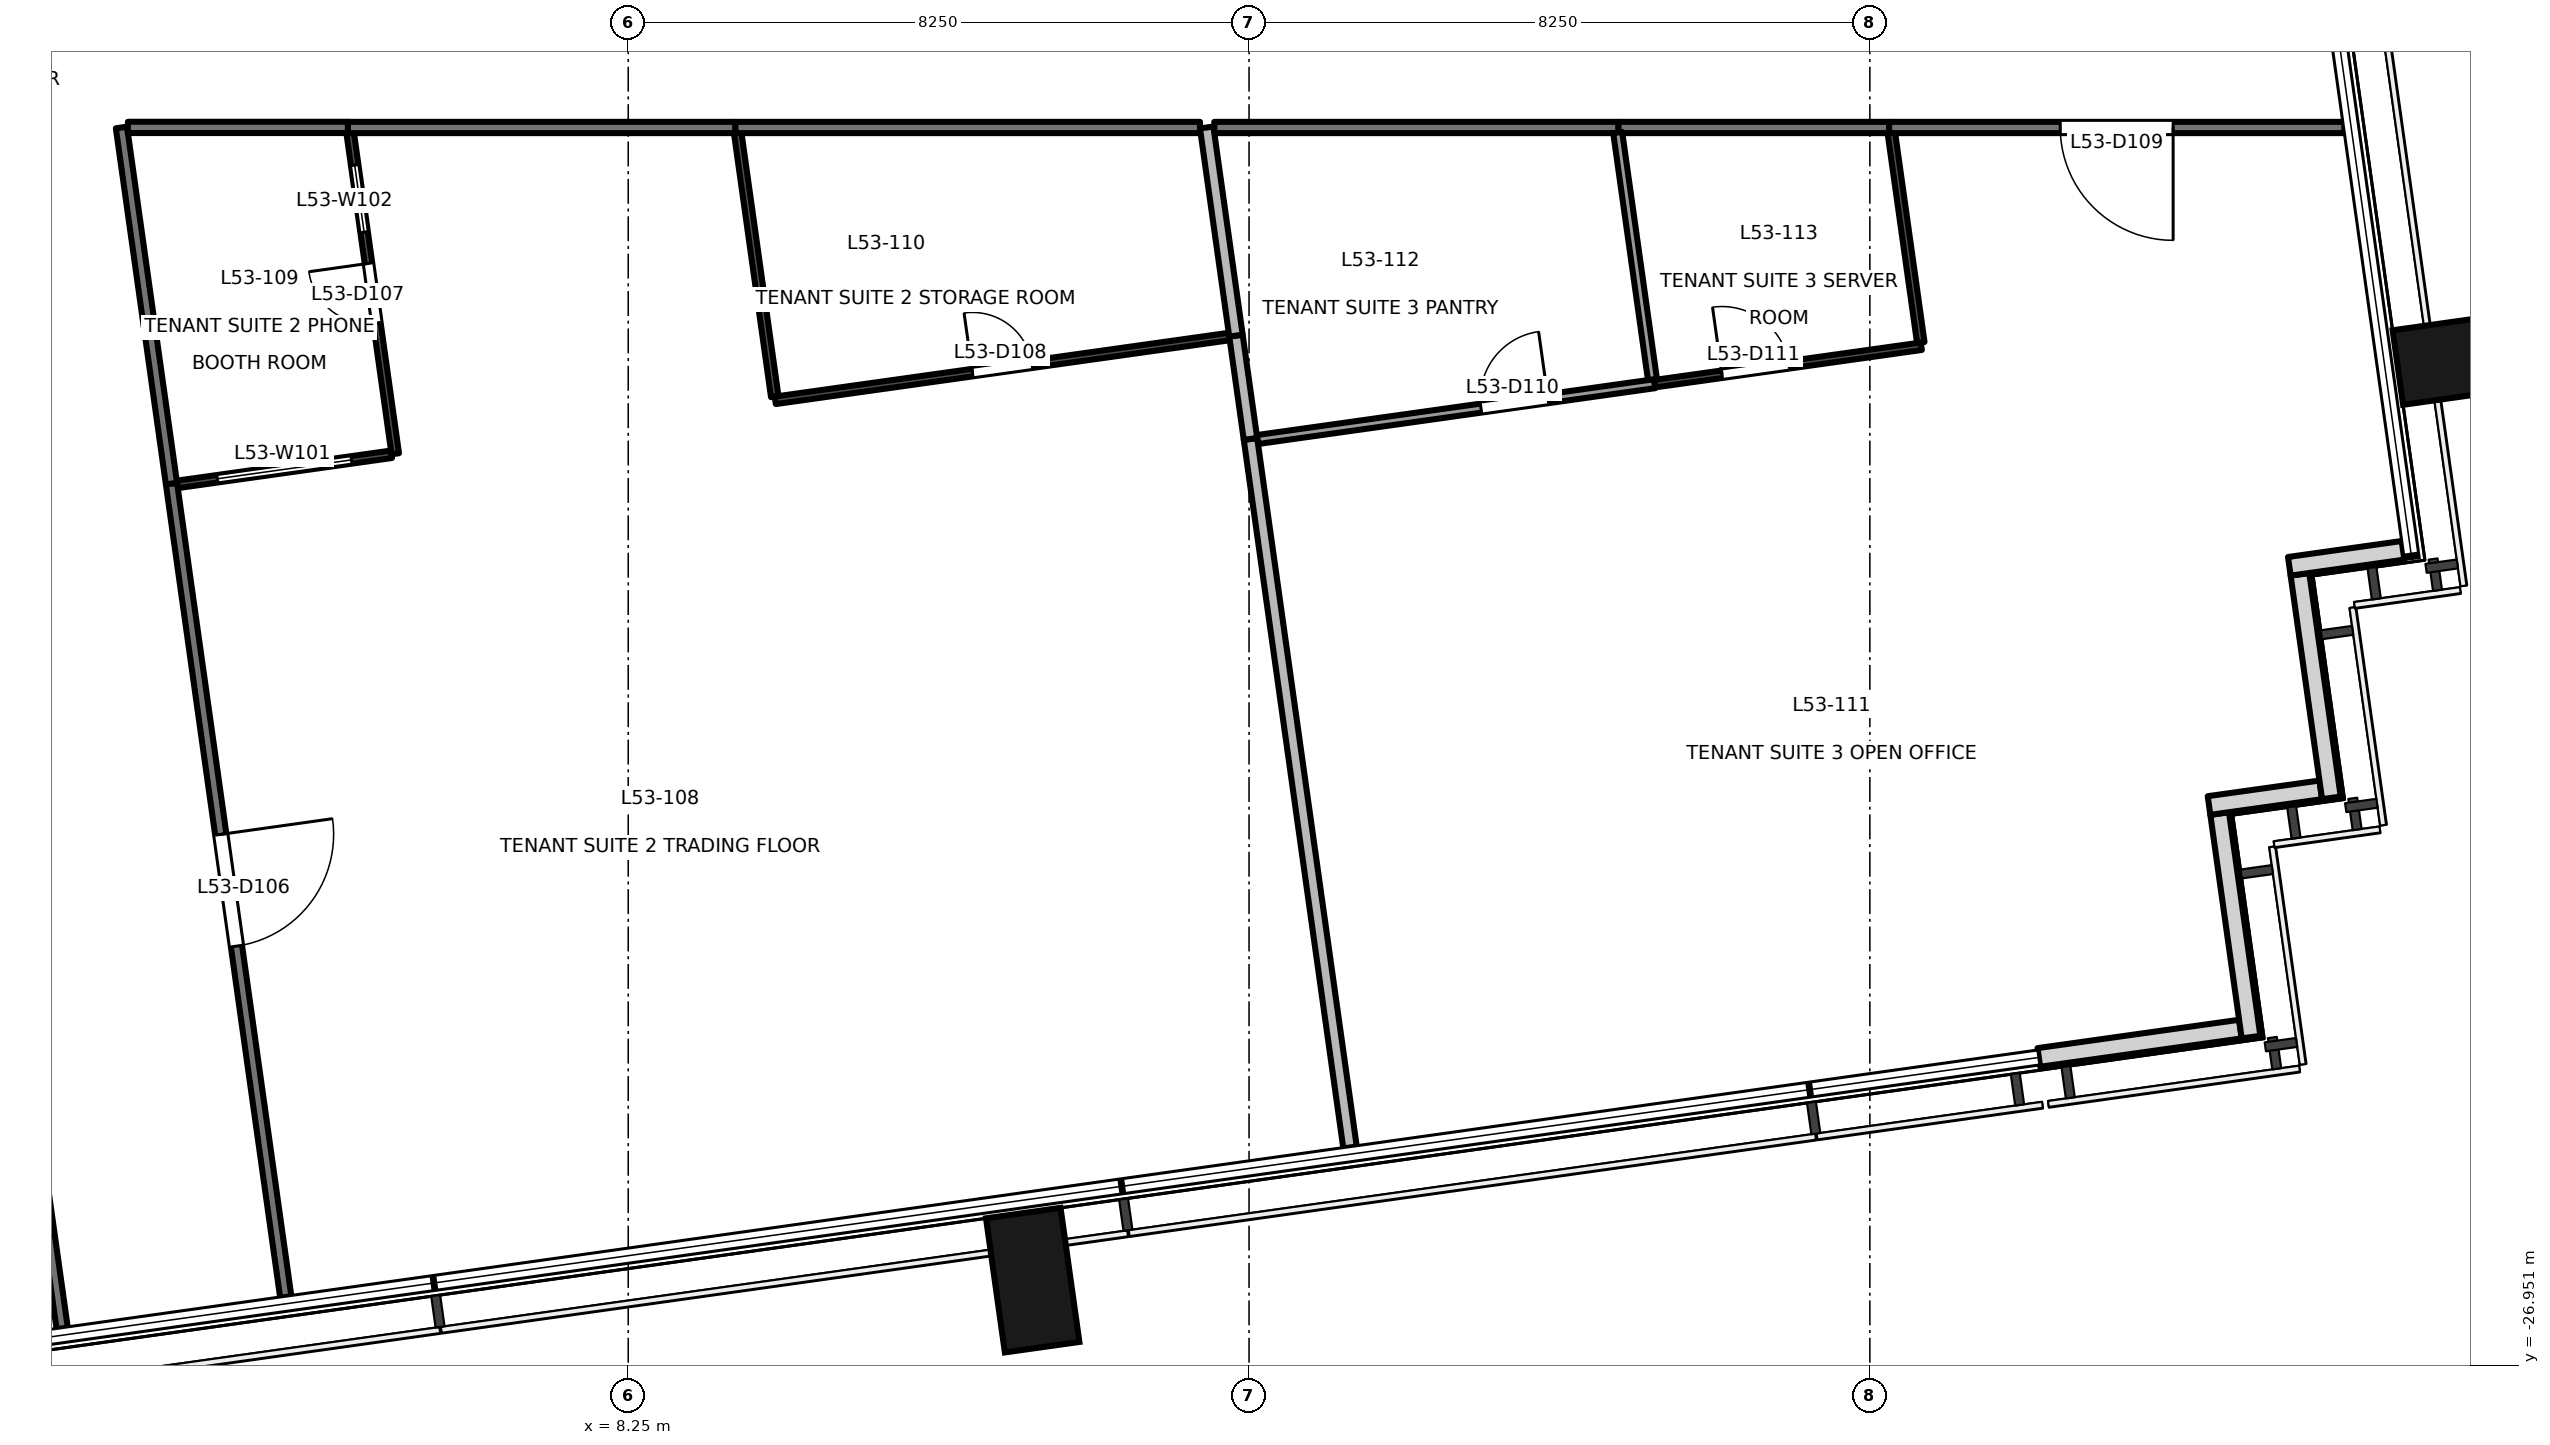
"""IFC4 building model, lengths in metres.
Left out: names, types, materials, properties, quantities, classifications, styles, units other than length and angle.
Written with IfcOpenShell. Run it as: python <this file> out.ifc"""

import sys

from ifc_helpers import new_model, si_unit, direction, frame, frame_2d, origin, origin_2d, place, context, subcontext, project, spatial, rectangle, extrude, element, fill, save


model = new_model("IFC4")
c1 = context("Model", 3, precision=1e-05, world=origin(), true_north=direction((0.0, 1.0)))
c2 = subcontext(c1, "Body", "Model", "MODEL_VIEW")
j1 = project(units=[si_unit("LENGTHUNIT", "METRE"), si_unit("PLANEANGLEUNIT", "RADIAN")], contexts=[c1])
p1 = place(None, origin())
s1 = spatial("IfcSite", under=j1, at=p1, CompositionType="ELEMENT")
p2 = place(p1, origin())
s2 = spatial("IfcBuilding", under=s1, at=p2, CompositionType="ELEMENT")
p3 = place(p2, frame((0.0, 0.0, 233.0)))
s3 = spatial("IfcBuildingStorey", under=s2, at=p3, CompositionType="ELEMENT", Elevation=233.0)
for number, where, z_axis, x_axis in (
    (1, (0.125, -27.716, -0.2), (0.0, 0.0, 1.0), (0.99, 0.139, 0.0)),
    (2, (13.625, -25.818, -0.2), (0.0, 0.0, 1.0), (0.99, 0.139, 0.0)),
    (3, (32.658, -13.565, -0.2), (0.0, 0.0, 1.0), (-0.139, 0.99, 0.0)),
):
    element("IfcColumn", number, at=place(p3, frame(where, z_axis=z_axis, x_axis=x_axis)), inside=s3, PredefinedType="COLUMN", context=c2, shape_type="SweptSolid", body=[
        extrude(rectangle(XDim=1.0, YDim=1.8, at=origin_2d()), origin(), (0.0, 0.0, 1.0), 3.9),
    ])
p4 = place(p3, frame((26.995, -22.859, 0.0), z_axis=(0.0, 0.0, 1.0), x_axis=(0.99024510326, 0.139336411139, 0.0)))
e4 = element("IfcWall", 4, at=p4, inside=s3, PredefinedType="SOLIDWALL", context=c2, shape_type="SweptSolid", body=[
    extrude(rectangle(XDim=2.705, YDim=0.25, at=frame_2d((1.353, 0.0))), origin(), (0.0, 0.0, 1.0), 3.7),
])
p5 = place(p3, frame((29.815, -22.588, 0.0), z_axis=(0.0, 0.0, 1.0), x_axis=(-0.138983028379, 0.9902947631, 0.0)))
e5 = element("IfcWall", 5, at=p5, inside=s3, PredefinedType="SOLIDWALL", context=c2, shape_type="SweptSolid", body=[
    extrude(rectangle(XDim=3.0, YDim=0.25, at=frame_2d((1.5, 0.0))), origin(), (0.0, 0.0, 1.0), 3.7),
])
p6 = place(p3, frame((29.257, -19.51, 0.0), z_axis=(0.0, 0.0, 1.0), x_axis=(0.990330117064, 0.138730887823, 0.0)))
e6 = element("IfcWall", 6, at=p6, inside=s3, PredefinedType="SOLIDWALL", context=c2, shape_type="SweptSolid", body=[
    extrude(rectangle(XDim=1.499, YDim=0.25, at=frame_2d((0.75, 0.0))), origin(), (0.0, 0.0, 1.0), 3.7),
])
p7 = place(p3, frame((30.883, -19.409, 0.0), z_axis=(0.0, 0.0, 1.0), x_axis=(-0.139324658755, 0.990246756855, 0.0)))
e7 = element("IfcWall", 7, at=p7, inside=s3, PredefinedType="SOLIDWALL", context=c2, shape_type="SweptSolid", body=[
    extrude(rectangle(XDim=3.0, YDim=0.25, at=frame_2d((1.5, 0.0))), origin(), (0.0, 0.0, 1.0), 3.7),
])
p8 = place(p3, frame((30.324, -16.332, 0.0), z_axis=(0.0, 0.0, 1.0), x_axis=(0.990238641016, 0.139382329723, 0.0)))
e8 = element("IfcWall", 8, at=p8, inside=s3, PredefinedType="SOLIDWALL", context=c2, shape_type="SweptSolid", body=[
    extrude(rectangle(XDim=1.526, YDim=0.25, at=frame_2d((0.763, 0.0))), origin(), (0.0, 0.0, 1.0), 3.7),
])
p9 = place(p3, frame((0.728, -26.46, 0.0), z_axis=(0.0, 0.0, 1.0), x_axis=(-0.139192487281, 0.990265343978, 0.0)))
e9 = element("IfcWall", 9, at=p9, inside=s3, PredefinedType="PARTITIONING", context=c2, shape_type="SweptSolid", body=[
    extrude(rectangle(XDim=5.46, YDim=0.15, at=frame_2d((2.73, 0.0))), origin(), (0.0, 0.0, 1.0), 2.8),
])
p10 = place(p3, frame((2.18, -15.233, 0.0), z_axis=(0.0, 0.0, 1.0), x_axis=(0.139166413059, -0.990269008642, 0.0)))
e10 = element("IfcWall", 10, at=p10, inside=s3, PredefinedType="PARTITIONING", context=c2, shape_type="SweptSolid", body=[
    extrude(rectangle(XDim=10.915, YDim=0.15, at=frame_2d((5.458, 0.0))), origin(), (0.0, 0.0, 1.0), 3.7),
])
p11 = place(p10, frame((4.707, 0.0, 0.0)))
e11 = element("IfcOpeningElement", 11, at=p11, cuts=e10, PredefinedType="OPENING", context=c2, shape_type="SweptSolid", body=[
    extrude(rectangle(XDim=1.5, YDim=2.1, at=frame_2d((0.75, 1.05))), frame((0.0, 0.085, 0.0), z_axis=(0.0, -1.0, 0.0), x_axis=(1.0, 0.0, 0.0)), (0.0, 0.0, 1.0), 0.171),
])
p12 = place(p3, frame((9.675, -10.5, 0.0), z_axis=(0.0, 0.0, 1.0), x_axis=(-1.0, 0.0, 0.0)))
e12 = element("IfcWall", 12, at=p12, inside=s3, PredefinedType="PARTITIONING", context=c2, shape_type="SweptSolid", body=[
    extrude(rectangle(XDim=5.151, YDim=0.15, at=frame_2d((2.576, 0.0))), origin(), (0.0, 0.0, 1.0), 2.8),
])
p13 = place(p3, frame((1.515, -10.5, 0.0), z_axis=(0.0, 0.0, 1.0), x_axis=(0.139146821365, -0.990271761742, 0.0)))
e13 = element("IfcWall", 13, at=p13, inside=s3, PredefinedType="PARTITIONING", context=c2, shape_type="SweptSolid", body=[
    extrude(rectangle(XDim=4.779, YDim=0.15, at=frame_2d((2.39, 0.0))), origin(), (0.0, 0.0, 1.0), 3.7),
])
p14 = place(p3, frame((4.524, -10.499, 0.0), z_axis=(0.0, 0.0, 1.0), x_axis=(-1.0, 0.0, 0.0)))
e14 = element("IfcWall", 14, at=p14, inside=s3, PredefinedType="PARTITIONING", context=c2, shape_type="SweptSolid", body=[
    extrude(rectangle(XDim=2.923, YDim=0.15, at=frame_2d((1.461, 0.0))), origin(), (0.0, 0.0, 1.0), 2.8),
])
p15 = place(p3, frame((15.848, -10.5, 0.0), z_axis=(0.0, 0.0, 1.0), x_axis=(-1.0, 0.0, 0.0)))
e15 = element("IfcWall", 15, at=p15, inside=s3, PredefinedType="PARTITIONING", context=c2, shape_type="SweptSolid", body=[
    extrude(rectangle(XDim=6.173, YDim=0.15, at=frame_2d((3.086, 0.0))), origin(), (0.0, 0.0, 1.0), 2.9),
])
p16 = place(p3, frame((31.055, -10.5, 0.0), z_axis=(0.0, 0.0, 1.0), x_axis=(-1.0, 0.0, 0.0)))
e16 = element("IfcWall", 16, at=p16, inside=s3, PredefinedType="PARTITIONING", context=c2, shape_type="SweptSolid", body=[
    extrude(rectangle(XDim=6.05, YDim=0.15, at=frame_2d((3.025, 0.0))), origin(), (0.0, 0.0, 1.0), 3.7),
])
p17 = place(p16, frame((2.275, 0.0, 0.0)))
e17 = element("IfcOpeningElement", 17, at=p17, cuts=e16, PredefinedType="OPENING", context=c2, shape_type="SweptSolid", body=[
    extrude(rectangle(XDim=1.5, YDim=2.1, at=frame_2d((0.75, 1.05))), frame((0.0, 0.085, 0.0), z_axis=(0.0, -1.0, 0.0), x_axis=(1.0, 0.0, 0.0)), (0.0, 0.0, 1.0), 0.171),
])
p18 = place(p3, frame((21.41, -10.5, 0.0), z_axis=(0.0, 0.0, 1.0), x_axis=(-1.0, 0.0, 0.0)))
e18 = element("IfcWall", 18, at=p18, inside=s3, PredefinedType="PARTITIONING", context=c2, shape_type="SweptSolid", body=[
    extrude(rectangle(XDim=5.372, YDim=0.15, at=frame_2d((2.686, 0.0))), origin(), (0.0, 0.0, 1.0), 3.7),
])
p19 = place(p3, frame((25.005, -10.5, 0.0), z_axis=(0.0, 0.0, 1.0), x_axis=(-1.0, 0.0, 0.0)))
e19 = element("IfcWall", 19, at=p19, inside=s3, PredefinedType="PARTITIONING", context=c2, shape_type="SweptSolid", body=[
    extrude(rectangle(XDim=3.595, YDim=0.15, at=frame_2d((1.797, 0.0))), origin(), (0.0, 0.0, 1.0), 3.7),
])
p20 = place(p3, frame((2.258, -15.243, 0.0), z_axis=(0.0, 0.0, 1.0), x_axis=(0.990271399447, 0.139149399699, 0.0)))
e20 = element("IfcWall", 20, at=p20, inside=s3, PredefinedType="PARTITIONING", context=c2, shape_type="SweptSolid", body=[
    extrude(rectangle(XDim=2.874, YDim=0.1, at=frame_2d((1.437, 0.0))), origin(), (0.0, 0.0, 1.0), 2.8),
])
p21 = place(p20, frame((0.537, 0.0, 0.9)))
e21 = element("IfcOpeningElement", 21, at=p21, cuts=e20, PredefinedType="OPENING", context=c2, shape_type="SweptSolid", body=[
    extrude(rectangle(XDim=1.8, YDim=1.2, at=frame_2d((0.9, 0.6))), frame((0.0, 0.061, 0.0), z_axis=(0.0, -1.0, 0.0), x_axis=(1.0, 0.0, 0.0)), (0.0, 0.0, 1.0), 0.121),
])
p22 = place(p3, frame((5.154, -14.836, 0.0), z_axis=(0.0, 0.0, 1.0), x_axis=(-0.139240076126, 0.990258653686, 0.0)))
e22 = element("IfcWall", 22, at=p22, inside=s3, PredefinedType="PARTITIONING", context=c2, shape_type="SweptSolid", body=[
    extrude(rectangle(XDim=4.31, YDim=0.1, at=frame_2d((2.155, 0.0))), origin(), (0.0, 0.0, 1.0), 2.8),
])
p23 = place(p22, frame((1.755, 0.0, 0.0)))
e23 = element("IfcOpeningElement", 23, at=p23, cuts=e22, PredefinedType="OPENING", context=c2, shape_type="SweptSolid", body=[
    extrude(rectangle(XDim=0.8, YDim=2.1, at=frame_2d((0.4, 1.05))), frame((0.0, 0.061, 0.0), z_axis=(0.0, -1.0, 0.0), x_axis=(1.0, 0.0, 0.0)), (0.0, 0.0, 1.0), 0.121),
])
p24 = place(p22, frame((2.974, 0.0, 0.9)))
e24 = element("IfcOpeningElement", 24, at=p24, cuts=e22, PredefinedType="OPENING", context=c2, shape_type="SweptSolid", body=[
    extrude(rectangle(XDim=0.9, YDim=1.2, at=frame_2d((0.45, 0.6))), frame((0.0, 0.061, 0.0), z_axis=(0.0, -1.0, 0.0), x_axis=(1.0, 0.0, 0.0)), (0.0, 0.0, 1.0), 0.121),
])
p25 = place(p3, frame((9.704, -10.568, 0.0), z_axis=(0.0, 0.0, 1.0), x_axis=(0.139115473097, -0.9902761661, 0.0)))
e25 = element("IfcWall", 25, at=p25, inside=s3, PredefinedType="PARTITIONING", context=c2, shape_type="SweptSolid", body=[
    extrude(rectangle(XDim=3.543, YDim=0.1, at=frame_2d((1.771, 0.0))), origin(), (0.0, 0.0, 1.0), 3.7),
])
p26 = place(p3, frame((10.204, -14.126, 0.0), z_axis=(0.0, 0.0, 1.0), x_axis=(0.99026754166, 0.139176851288, 0.0)))
e26 = element("IfcWall", 26, at=p26, inside=s3, PredefinedType="PARTITIONING", context=c2, shape_type="SweptSolid", body=[
    extrude(rectangle(XDim=6.092, YDim=0.1, at=frame_2d((3.046, 0.0))), origin(), (0.0, 0.0, 1.0), 2.9),
])
p27 = place(p26, frame((2.646, 0.0, 0.0)))
e27 = element("IfcOpeningElement", 27, at=p27, cuts=e26, PredefinedType="OPENING", context=c2, shape_type="SweptSolid", body=[
    extrude(rectangle(XDim=0.8, YDim=2.1, at=frame_2d((0.4, 1.05))), frame((0.0, 0.061, 0.0), z_axis=(0.0, -1.0, 0.0), x_axis=(1.0, 0.0, 0.0)), (0.0, 0.0, 1.0), 0.121),
])
p28 = place(p3, frame((16.519, -14.639, 0.0), z_axis=(0.0, 0.0, 1.0), x_axis=(0.139138381639, -0.990272947603, 0.0)))
e28 = element("IfcWall", 28, at=p28, inside=s3, PredefinedType="PARTITIONING", context=c2, shape_type="SweptSolid", body=[
    extrude(rectangle(XDim=9.509, YDim=0.18, at=frame_2d((4.754, 0.0))), origin(), (0.0, 0.0, 1.0), 3.7),
])
p29 = place(p3, frame((16.326, -13.266, 0.0), z_axis=(0.0, 0.0, 1.0), x_axis=(0.13930070257, -0.990250127121, 0.0)))
e29 = element("IfcWall", 29, at=p29, inside=s3, PredefinedType="PARTITIONING", context=c2, shape_type="SweptSolid", body=[
    extrude(rectangle(XDim=1.386, YDim=0.18, at=frame_2d((0.693, 0.0))), origin(), (0.0, 0.0, 1.0), 3.7),
])
p30 = place(p3, frame((15.937, -10.5, 0.0), z_axis=(0.0, 0.0, 1.0), x_axis=(0.139230726348, -0.990259968312, 0.0)))
e30 = element("IfcWall", 30, at=p30, inside=s3, PredefinedType="PARTITIONING", context=c2, shape_type="SweptSolid", body=[
    extrude(rectangle(XDim=2.793, YDim=0.18, at=frame_2d((1.396, 0.0))), origin(), (0.0, 0.0, 1.0), 3.7),
])
p31 = place(p3, frame((16.611, -14.647, 0.0), z_axis=(0.0, 0.0, 1.0), x_axis=(0.990263091894, 0.139208508477, 0.0)))
e31 = element("IfcWall", 31, at=p31, inside=s3, PredefinedType="PARTITIONING", context=c2, shape_type="SweptSolid", body=[
    extrude(rectangle(XDim=5.33, YDim=0.12, at=frame_2d((2.665, 0.0))), origin(), (0.0, 0.0, 1.0), 3.7),
])
p32 = place(p31, frame((3.0, 0.0, 0.0)))
e32 = element("IfcOpeningElement", 32, at=p32, cuts=e31, PredefinedType="OPENING", context=c2, shape_type="SweptSolid", body=[
    extrude(rectangle(XDim=0.9, YDim=2.1, at=frame_2d((0.45, 1.05))), frame((0.0, 0.071, 0.0), z_axis=(0.0, -1.0, 0.0), x_axis=(1.0, 0.0, 0.0)), (0.0, 0.0, 1.0), 0.141),
])
p33 = place(p3, frame((21.889, -13.905, 0.0), z_axis=(0.0, 0.0, 1.0), x_axis=(0.990275524816, 0.139120037919, 0.0)))
e33 = element("IfcWall", 33, at=p33, inside=s3, PredefinedType="PARTITIONING", context=c2, shape_type="SweptSolid", body=[
    extrude(rectangle(XDim=3.58, YDim=0.1, at=frame_2d((1.79, 0.0))), origin(), (0.0, 0.0, 1.0), 3.7),
])
p34 = place(p33, frame((0.904, 0.0, 0.0)))
e34 = element("IfcOpeningElement", 34, at=p34, cuts=e33, PredefinedType="OPENING", context=c2, shape_type="SweptSolid", body=[
    extrude(rectangle(XDim=0.9, YDim=2.1, at=frame_2d((0.45, 1.05))), frame((0.0, 0.061, 0.0), z_axis=(0.0, -1.0, 0.0), x_axis=(1.0, 0.0, 0.0)), (0.0, 0.0, 1.0), 0.121),
])
p35 = place(p3, frame((25.427, -13.358, 0.0), z_axis=(0.0, 0.0, 1.0), x_axis=(-0.139176490191, 0.99026759241, 0.0)))
e35 = element("IfcWall", 35, at=p35, inside=s3, PredefinedType="PARTITIONING", context=c2, shape_type="SweptSolid", body=[
    extrude(rectangle(XDim=2.817, YDim=0.1, at=frame_2d((1.409, 0.0))), origin(), (0.0, 0.0, 1.0), 3.7),
])
p36 = place(p3, frame((21.399, -10.567, 0.0), z_axis=(0.0, 0.0, 1.0), x_axis=(0.139430884239, -0.990231805448, 0.0)))
e36 = element("IfcWall", 36, at=p36, inside=s3, PredefinedType="PARTITIONING", context=c2, shape_type="SweptSolid", body=[
    extrude(rectangle(XDim=3.315, YDim=0.12, at=frame_2d((1.657, 0.0))), origin(), (0.0, 0.0, 1.0), 3.7),
])
p37 = place(p11, origin())
e37 = element("IfcDoor", 37, at=p37, inside=s3, OperationType="DOUBLE_DOOR_SINGLE_SWING", PredefinedType="DOOR", context=c2, shape_type="SweptSolid", body=[
    extrude(rectangle(XDim=1.5, YDim=2.1, at=frame_2d((0.75, 1.05))), frame((0.0, 0.025, 0.0), z_axis=(0.0, -1.0, 0.0), x_axis=(1.0, 0.0, 0.0)), (0.0, 0.0, 1.0), 0.05),
])
fill(e11, e37)
p38 = place(p23, origin())
e38 = element("IfcDoor", 38, at=p38, inside=s3, OperationType="SINGLE_SWING_RIGHT", PredefinedType="DOOR", context=c2, shape_type="SweptSolid", body=[
    extrude(rectangle(XDim=0.8, YDim=2.1, at=frame_2d((0.4, 1.05))), frame((0.0, 0.025, 0.0), z_axis=(0.0, -1.0, 0.0), x_axis=(1.0, 0.0, 0.0)), (0.0, 0.0, 1.0), 0.05),
])
fill(e23, e38)
p39 = place(p27, origin())
e39 = element("IfcDoor", 39, at=p39, inside=s3, OperationType="SINGLE_SWING_LEFT", PredefinedType="DOOR", context=c2, shape_type="SweptSolid", body=[
    extrude(rectangle(XDim=0.8, YDim=2.1, at=frame_2d((0.4, 1.05))), frame((0.0, 0.025, 0.0), z_axis=(0.0, -1.0, 0.0), x_axis=(1.0, 0.0, 0.0)), (0.0, 0.0, 1.0), 0.05),
])
fill(e27, e39)
p40 = place(p17, origin())
e40 = element("IfcDoor", 40, at=p40, inside=s3, OperationType="DOUBLE_DOOR_SINGLE_SWING", PredefinedType="DOOR", context=c2, shape_type="SweptSolid", body=[
    extrude(rectangle(XDim=1.5, YDim=2.1, at=frame_2d((0.75, 1.05))), frame((0.0, 0.025, 0.0), z_axis=(0.0, -1.0, 0.0), x_axis=(1.0, 0.0, 0.0)), (0.0, 0.0, 1.0), 0.05),
])
fill(e17, e40)
p41 = place(p32, origin())
e41 = element("IfcDoor", 41, at=p41, inside=s3, OperationType="SINGLE_SWING_RIGHT", PredefinedType="DOOR", context=c2, shape_type="SweptSolid", body=[
    extrude(rectangle(XDim=0.9, YDim=2.1, at=frame_2d((0.45, 1.05))), frame((0.0, 0.025, 0.0), z_axis=(0.0, -1.0, 0.0), x_axis=(1.0, 0.0, 0.0)), (0.0, 0.0, 1.0), 0.05),
])
fill(e32, e41)
p42 = place(p34, origin())
e42 = element("IfcDoor", 42, at=p42, inside=s3, OperationType="SINGLE_SWING_LEFT", PredefinedType="DOOR", context=c2, shape_type="SweptSolid", body=[
    extrude(rectangle(XDim=0.9, YDim=2.1, at=frame_2d((0.45, 1.05))), frame((0.0, 0.025, 0.0), z_axis=(0.0, -1.0, 0.0), x_axis=(1.0, 0.0, 0.0)), (0.0, 0.0, 1.0), 0.05),
])
fill(e34, e42)
p43 = place(p21, origin())
e43 = element("IfcWindow", 43, at=p43, inside=s3, PartitioningType="SINGLE_PANEL", PredefinedType="WINDOW", context=c2, shape_type="SweptSolid", body=[
    extrude(rectangle(XDim=1.8, YDim=1.2, at=frame_2d((0.9, 0.6))), frame((0.0, 0.03, 0.0), z_axis=(0.0, -1.0, 0.0), x_axis=(1.0, 0.0, 0.0)), (0.0, 0.0, 1.0), 0.06),
])
fill(e21, e43)
p44 = place(p24, origin())
e44 = element("IfcWindow", 44, at=p44, inside=s3, PartitioningType="SINGLE_PANEL", PredefinedType="WINDOW", context=c2, shape_type="SweptSolid", body=[
    extrude(rectangle(XDim=0.9, YDim=1.2, at=frame_2d((0.45, 0.6))), frame((0.0, 0.03, 0.0), z_axis=(0.0, -1.0, 0.0), x_axis=(1.0, 0.0, 0.0)), (0.0, 0.0, 1.0), 0.06),
])
fill(e24, e44)
save(model, sys.argv[1])
